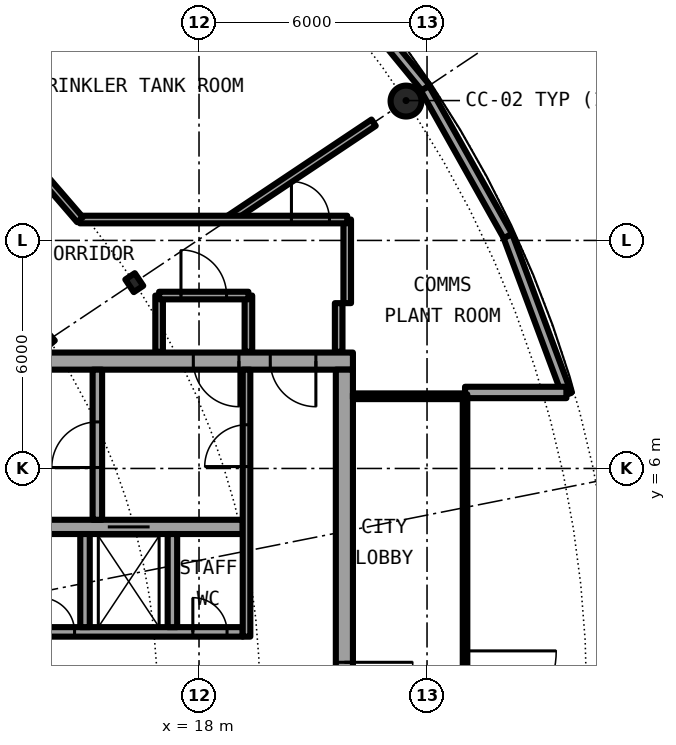
"""IFC4 building model, lengths in metres.
Left out: names, types, materials, properties, quantities, classifications, styles, units other than length and angle.
Written with IfcOpenShell. Run it as: python <this file> out.ifc"""

import sys

from ifc_helpers import new_model, si_unit, direction, frame, frame_2d, origin, origin_2d, place, context, subcontext, project, spatial, rectangle, hollow_circle, i_section, extrude, element, fill, save


model = new_model("IFC4")
c1 = context("Model", 3, precision=1e-05, world=origin(), true_north=direction((0.0, 1.0)))
c2 = subcontext(c1, "Body", "Model", "MODEL_VIEW")
j1 = project(units=[si_unit("LENGTHUNIT", "METRE"), si_unit("PLANEANGLEUNIT", "RADIAN")], contexts=[c1])
p1 = place(None, origin())
s1 = spatial("IfcSite", under=j1, at=p1, CompositionType="ELEMENT")
p2 = place(p1, origin())
s2 = spatial("IfcBuilding", under=s1, at=p2, CompositionType="ELEMENT")
p3 = place(p2, frame((0.0, 0.0, 186.0)))
s3 = spatial("IfcBuildingStorey", under=s2, at=p3, CompositionType="ELEMENT", Elevation=186.0)
p4 = place(p3, frame((23.448, 15.667, 0.0), z_axis=(0.0, 0.0, 1.0), x_axis=(1.0, 0.0, 0.0)))
e1 = element("IfcColumn", 1, at=p4, inside=s3, PredefinedType="COLUMN", context=c2, shape_type="SweptSolid", body=[
    extrude(hollow_circle(Radius=0.406, WallThickness=0.03, at=origin_2d()), origin(), (0.0, 0.0, 1.0), 4.2),
])
p5 = place(p3, frame((16.297, 10.889, 0.0), z_axis=(0.0, 0.0, 1.0), x_axis=(0.831469612303, 0.55557023302, 0.0)))
e2 = element("IfcColumn", 2, at=p5, inside=s3, PredefinedType="COLUMN", context=c2, shape_type="SweptSolid", body=[
    extrude(i_section(OverallWidth=0.3, OverallDepth=0.4, WebThickness=0.013, FlangeThickness=0.024, FilletRadius=0.027, at=origin_2d()), origin(), (0.0, 0.0, 1.0), 4.2),
])
p6 = place(p3, frame((23.967, 16.014, 0.0), z_axis=(0.0, 0.0, 1.0), x_axis=(-0.634403999748, 0.773001659186, 0.0)))
e3 = element("IfcWall", 3, at=p6, inside=s3, PredefinedType="SOLIDWALL", context=c2, shape_type="SweptSolid", body=[
    extrude(rectangle(XDim=5.651, YDim=0.25, at=frame_2d((2.825, 0.0))), origin(), (0.0, 0.0, 1.0), 3.85),
])
p7 = place(p3, frame((27.682, 7.945, 0.0), z_axis=(0.0, 0.0, 1.0), x_axis=(-0.349247811493, 0.937030397675, 0.0)))
e4 = element("IfcWall", 4, at=p7, inside=s3, PredefinedType="SOLIDWALL", context=c2, shape_type="SweptSolid", body=[
    extrude(rectangle(XDim=4.452, YDim=0.25, at=frame_2d((2.226, 0.0))), origin(), (0.0, 0.0, 1.0), 3.85),
])
p8 = place(p3, frame((26.127, 12.117, 0.0), z_axis=(0.0, 0.0, 1.0), x_axis=(-0.489696356642, 0.871893042919, 0.0)))
e5 = element("IfcWall", 5, at=p8, inside=s3, PredefinedType="SOLIDWALL", context=c2, shape_type="SweptSolid", body=[
    extrude(rectangle(XDim=4.454, YDim=0.25, at=frame_2d((2.227, 0.0))), origin(), (0.0, 0.0, 1.0), 3.85),
])
p9 = place(p3, frame((25.0, 8.0, 0.0), z_axis=(0.0, 0.0, 1.0), x_axis=(1.0, 0.0, 0.0)))
e6 = element("IfcWall", 6, at=p9, inside=s3, PredefinedType="SOLIDWALL", context=c2, shape_type="SweptSolid", body=[
    extrude(rectangle(XDim=2.667, YDim=0.3, at=frame_2d((1.333, 0.0))), origin(), (0.0, 0.0, 1.0), 3.85),
])
p10 = place(p3, frame((22.05, 8.825, 0.0), z_axis=(0.0, 0.0, 1.0), x_axis=(-1.0, 0.0, 0.0)))
e7 = element("IfcWall", 7, at=p10, inside=s3, PredefinedType="SHEAR", context=c2, shape_type="SweptSolid", body=[
    extrude(rectangle(XDim=13.5, YDim=0.45, at=frame_2d((6.75, 0.0))), origin(), (0.0, 0.0, 1.0), 4.2),
])
p11 = place(p10, frame((0.975, 0.0, 0.0)))
e8 = element("IfcOpeningElement", 8, at=p11, cuts=e7, PredefinedType="OPENING", context=c2, shape_type="SweptSolid", body=[
    extrude(rectangle(XDim=1.2, YDim=2.3, at=frame_2d((0.6, 1.15))), frame((0.0, 0.235, 0.0), z_axis=(0.0, -1.0, 0.0), x_axis=(1.0, 0.0, 0.0)), (0.0, 0.0, 1.0), 0.47),
])
p12 = place(p10, frame((3.0, 0.0, 0.0)))
e9 = element("IfcOpeningElement", 9, at=p12, cuts=e7, PredefinedType="OPENING", context=c2, shape_type="SweptSolid", body=[
    extrude(rectangle(XDim=1.2, YDim=2.3, at=frame_2d((0.6, 1.15))), frame((0.0, 0.235, 0.0), z_axis=(0.0, -1.0, 0.0), x_axis=(1.0, 0.0, 0.0)), (0.0, 0.0, 1.0), 0.47),
])
p13 = place(p3, frame((21.825, 8.6, 0.0), z_axis=(0.0, 0.0, 1.0), x_axis=(0.0, -1.0, 0.0)))
e10 = element("IfcWall", 10, at=p13, inside=s3, PredefinedType="SHEAR", context=c2, shape_type="SweptSolid", body=[
    extrude(rectangle(XDim=17.2, YDim=0.45, at=frame_2d((8.6, 0.0))), origin(), (0.0, 0.0, 1.0), 4.2),
])
p14 = place(p13, frame((7.7, 0.0, 0.0)))
e11 = element("IfcOpeningElement", 11, at=p14, cuts=e10, PredefinedType="OPENING", context=c2, shape_type="SweptSolid", body=[
    extrude(rectangle(XDim=1.8, YDim=2.3, at=frame_2d((0.9, 1.15))), frame((0.0, 0.235, 0.0), z_axis=(0.0, -1.0, 0.0), x_axis=(1.0, 0.0, 0.0)), (0.0, 0.0, 1.0), 0.47),
])
p15 = place(p3, frame((9.0, 1.7, 0.0), z_axis=(0.0, 0.0, 1.0), x_axis=(1.0, 0.0, 0.0)))
e12 = element("IfcWall", 12, at=p15, inside=s3, PredefinedType="SHEAR", context=c2, shape_type="SweptSolid", body=[
    extrude(rectangle(XDim=10.15, YDim=0.25, at=frame_2d((5.075, 0.0))), origin(), (0.0, 0.0, 1.0), 4.2),
])
p16 = place(p15, frame((0.613, 0.0, 0.0)))
e13 = element("IfcOpeningElement", 13, at=p16, cuts=e12, PredefinedType="OPENING", context=c2, shape_type="SweptSolid", body=[
    extrude(rectangle(XDim=0.9, YDim=2.3, at=frame_2d((0.45, 1.15))), frame((0.0, 0.135, 0.0), z_axis=(0.0, -1.0, 0.0), x_axis=(1.0, 0.0, 0.0)), (0.0, 0.0, 1.0), 0.27),
])
p17 = place(p15, frame((2.95, 0.0, 0.0)))
e14 = element("IfcOpeningElement", 14, at=p17, cuts=e12, PredefinedType="OPENING", context=c2, shape_type="SweptSolid", body=[
    extrude(rectangle(XDim=0.9, YDim=2.3, at=frame_2d((0.45, 1.15))), frame((0.0, 0.135, 0.0), z_axis=(0.0, -1.0, 0.0), x_axis=(1.0, 0.0, 0.0)), (0.0, 0.0, 1.0), 0.27),
])
p18 = place(p15, frame((4.825, 0.0, 0.0)))
e15 = element("IfcOpeningElement", 15, at=p18, cuts=e12, PredefinedType="OPENING", context=c2, shape_type="SweptSolid", body=[
    extrude(rectangle(XDim=0.9, YDim=2.3, at=frame_2d((0.45, 1.15))), frame((0.0, 0.135, 0.0), z_axis=(0.0, -1.0, 0.0), x_axis=(1.0, 0.0, 0.0)), (0.0, 0.0, 1.0), 0.27),
])
p19 = place(p15, frame((8.837, 0.0, 0.0)))
e16 = element("IfcOpeningElement", 16, at=p19, cuts=e12, PredefinedType="OPENING", context=c2, shape_type="SweptSolid", body=[
    extrude(rectangle(XDim=0.9, YDim=2.3, at=frame_2d((0.45, 1.15))), frame((0.0, 0.135, 0.0), z_axis=(0.0, -1.0, 0.0), x_axis=(1.0, 0.0, 0.0)), (0.0, 0.0, 1.0), 0.27),
])
p20 = place(p3, frame((9.0, 4.462, 0.0), z_axis=(0.0, 0.0, 1.0), x_axis=(1.0, 0.0, 0.0)))
e17 = element("IfcWall", 17, at=p20, inside=s3, PredefinedType="SHEAR", context=c2, shape_type="SweptSolid", body=[
    extrude(rectangle(XDim=10.15, YDim=0.375, at=frame_2d((5.075, 0.0))), origin(), (0.0, 0.0, 1.0), 4.2),
])
p21 = place(p20, frame((6.6, 0.0, 0.0)))
e18 = element("IfcOpeningElement", 18, at=p21, cuts=e17, PredefinedType="OPENING", context=c2, shape_type="SweptSolid", body=[
    extrude(rectangle(XDim=1.1, YDim=2.3, at=frame_2d((0.55, 1.15))), frame((0.0, 0.198, 0.0), z_axis=(0.0, -1.0, 0.0), x_axis=(1.0, 0.0, 0.0)), (0.0, 0.0, 1.0), 0.395),
])
p22 = place(p3, frame((15.325, 4.65, 0.0), z_axis=(0.0, 0.0, 1.0), x_axis=(0.0, 1.0, 0.0)))
e19 = element("IfcWall", 19, at=p22, inside=s3, PredefinedType="SHEAR", context=c2, shape_type="SweptSolid", body=[
    extrude(rectangle(XDim=3.95, YDim=0.25, at=frame_2d((1.975, 0.0))), origin(), (0.0, 0.0, 1.0), 4.2),
])
p23 = place(p22, frame((1.375, 0.0, 0.0)))
e20 = element("IfcOpeningElement", 20, at=p23, cuts=e19, PredefinedType="OPENING", context=c2, shape_type="SweptSolid", body=[
    extrude(rectangle(XDim=1.2, YDim=2.3, at=frame_2d((0.6, 1.15))), frame((0.0, 0.135, 0.0), z_axis=(0.0, -1.0, 0.0), x_axis=(1.0, 0.0, 0.0)), (0.0, 0.0, 1.0), 0.27),
])
for number, where, z_axis, x_axis in (
    (21, (15.0, 1.825, 0.0), (0.0, 0.0, 1.0), (0.0, 1.0, 0.0)),
    (22, (17.3, 1.825, 0.0), (0.0, 0.0, 1.0), (0.0, 1.0, 0.0)),
):
    element("IfcWall", number, at=place(p3, frame(where, z_axis=z_axis, x_axis=x_axis)), inside=s3, PredefinedType="SOLIDWALL", context=c2, shape_type="SweptSolid", body=[
        extrude(rectangle(XDim=2.45, YDim=0.25, at=frame_2d((1.225, 0.0))), origin(), (0.0, 0.0, 1.0), 3.85),
    ])
p24 = place(p3, frame((19.25, 1.575, 0.0), z_axis=(0.0, 0.0, 1.0), x_axis=(0.0, 1.0, 0.0)))
e23 = element("IfcWall", 23, at=p24, inside=s3, PredefinedType="SOLIDWALL", context=c2, shape_type="SweptSolid", body=[
    extrude(rectangle(XDim=7.025, YDim=0.2, at=frame_2d((3.513, 0.0))), origin(), (0.0, 0.0, 1.0), 3.85),
])
p25 = place(p24, frame((4.475, 0.0, 0.0)))
e24 = element("IfcOpeningElement", 24, at=p25, cuts=e23, PredefinedType="OPENING", context=c2, shape_type="SweptSolid", body=[
    extrude(rectangle(XDim=1.1, YDim=2.3, at=frame_2d((0.55, 1.15))), frame((0.0, 0.11, 0.0), z_axis=(0.0, -1.0, 0.0), x_axis=(1.0, 0.0, 0.0)), (0.0, 0.0, 1.0), 0.22),
])
p26 = place(p3, frame((22.05, 7.9, 0.0), z_axis=(0.0, 0.0, 1.0), x_axis=(1.0, 0.0, 0.0)))
e25 = element("IfcWall", 25, at=p26, inside=s3, PredefinedType="PARTITIONING", context=c2, shape_type="SweptSolid", body=[
    extrude(rectangle(XDim=2.89, YDim=0.15, at=frame_2d((1.445, 0.0))), origin(), (0.0, 0.0, 1.0), 3.85),
])
p27 = place(p3, frame((25.0, 7.95, 0.0), z_axis=(0.0, 0.0, 1.0), x_axis=(0.0, -1.0, 0.0)))
e26 = element("IfcWall", 26, at=p27, inside=s3, PredefinedType="PARTITIONING", context=c2, shape_type="SweptSolid", body=[
    extrude(rectangle(XDim=15.9, YDim=0.12, at=frame_2d((7.95, 0.0))), origin(), (0.0, 0.0, 1.0), 3.85),
])
p28 = place(p27, frame((6.75, 0.0, 0.0)))
e27 = element("IfcOpeningElement", 27, at=p28, cuts=e26, PredefinedType="OPENING", context=c2, shape_type="SweptSolid", body=[
    extrude(rectangle(XDim=2.4, YDim=2.3, at=frame_2d((1.2, 1.15))), frame((0.0, 0.07, 0.0), z_axis=(0.0, -1.0, 0.0), x_axis=(1.0, 0.0, 0.0)), (0.0, 0.0, 1.0), 0.14),
])
p29 = place(p27, frame((11.55, 0.0, 0.1)))
e28 = element("IfcOpeningElement", 28, at=p29, cuts=e26, PredefinedType="OPENING", context=c2, shape_type="SweptSolid", body=[
    extrude(rectangle(XDim=3.4, YDim=3.5, at=frame_2d((1.7, 1.75))), frame((0.0, 0.07, 0.0), z_axis=(0.0, -1.0, 0.0), x_axis=(1.0, 0.0, 0.0)), (0.0, 0.0, 1.0), 0.14),
])
p30 = place(p27, frame((0.95, 0.0, 0.1)))
e29 = element("IfcOpeningElement", 29, at=p30, cuts=e26, PredefinedType="OPENING", context=c2, shape_type="SweptSolid", body=[
    extrude(rectangle(XDim=3.4, YDim=3.5, at=frame_2d((1.7, 1.75))), frame((0.0, 0.07, 0.0), z_axis=(0.0, -1.0, 0.0), x_axis=(1.0, 0.0, 0.0)), (0.0, 0.0, 1.0), 0.14),
])
p31 = place(p3, frame((21.9, 10.35, 0.0), z_axis=(0.0, 0.0, 1.0), x_axis=(0.0, 1.0, 0.0)))
e30 = element("IfcWall", 30, at=p31, inside=s3, PredefinedType="PARTITIONING", context=c2, shape_type="SweptSolid", body=[
    extrude(rectangle(XDim=2.2, YDim=0.2, at=frame_2d((1.1, 0.0))), origin(), (0.0, 0.0, 1.0), 3.85),
])
p32 = place(p3, frame((21.675, 9.07, 0.0), z_axis=(0.0, 0.0, 1.0), x_axis=(0.0, 1.0, 0.0)))
e31 = element("IfcWall", 31, at=p32, inside=s3, PredefinedType="PARTITIONING", context=c2, shape_type="SweptSolid", body=[
    extrude(rectangle(XDim=1.28, YDim=0.2, at=frame_2d((0.64, 0.0))), origin(), (0.0, 0.0, 1.0), 3.85),
])
for number, where, z_axis, x_axis in (
    (32, (19.3, 9.07, 0.0), (0.0, 0.0, 1.0), (0.0, 1.0, 0.0)),
    (33, (16.95, 9.07, 0.0), (0.0, 0.0, 1.0), (0.0, 1.0, 0.0)),
):
    element("IfcWall", number, at=place(p3, frame(where, z_axis=z_axis, x_axis=x_axis)), inside=s3, PredefinedType="PARTITIONING", context=c2, shape_type="SweptSolid", body=[
        extrude(rectangle(XDim=1.48, YDim=0.2, at=frame_2d((0.74, 0.0))), origin(), (0.0, 0.0, 1.0), 3.85),
    ])
p33 = place(p3, frame((18.782, 12.55, 0.0), z_axis=(0.0, 0.0, 1.0), x_axis=(0.831460118694, 0.555584440946, 0.0)))
e34 = element("IfcWall", 34, at=p33, inside=s3, PredefinedType="PARTITIONING", context=c2, shape_type="SweptSolid", body=[
    extrude(rectangle(XDim=4.586, YDim=0.2, at=frame_2d((2.293, 0.0))), origin(), (0.0, 0.0, 1.0), 3.85),
])
p34 = place(p3, frame((16.95, 10.55, 0.0), z_axis=(0.0, 0.0, 1.0), x_axis=(1.0, 0.0, 0.0)))
e35 = element("IfcWall", 35, at=p34, inside=s3, PredefinedType="PARTITIONING", context=c2, shape_type="SweptSolid", body=[
    extrude(rectangle(XDim=2.35, YDim=0.2, at=frame_2d((1.175, 0.0))), origin(), (0.0, 0.0, 1.0), 3.85),
])
p35 = place(p34, frame((0.575, 0.0, 0.0)))
e36 = element("IfcOpeningElement", 36, at=p35, cuts=e35, PredefinedType="OPENING", context=c2, shape_type="SweptSolid", body=[
    extrude(rectangle(XDim=1.2, YDim=2.3, at=frame_2d((0.6, 1.15))), frame((0.0, 0.11, 0.0), z_axis=(0.0, -1.0, 0.0), x_axis=(1.0, 0.0, 0.0)), (0.0, 0.0, 1.0), 0.22),
])
p36 = place(p3, frame((14.865, 12.55, 0.0), z_axis=(0.0, 0.0, 1.0), x_axis=(1.0, 0.0, 0.0)))
e37 = element("IfcWall", 37, at=p36, inside=s3, PredefinedType="PARTITIONING", context=c2, shape_type="SweptSolid", body=[
    extrude(rectangle(XDim=7.035, YDim=0.2, at=frame_2d((3.518, 0.0))), origin(), (0.0, 0.0, 1.0), 3.85),
])
p37 = place(p36, frame((5.567, 0.0, 0.0)))
e38 = element("IfcOpeningElement", 38, at=p37, cuts=e37, PredefinedType="OPENING", context=c2, shape_type="SweptSolid", body=[
    extrude(rectangle(XDim=1.0, YDim=2.3, at=frame_2d((0.5, 1.15))), frame((0.0, 0.11, 0.0), z_axis=(0.0, -1.0, 0.0), x_axis=(1.0, 0.0, 0.0)), (0.0, 0.0, 1.0), 0.22),
])
p38 = place(p3, frame((11.349, 12.522, 0.0), z_axis=(0.0, 0.0, 1.0), x_axis=(0.65324486504, -0.757146713853, 0.0)))
e39 = element("IfcWall", 39, at=p38, inside=s3, PredefinedType="PARTITIONING", context=c2, shape_type="SweptSolid", body=[
    extrude(rectangle(XDim=4.255, YDim=0.2, at=frame_2d((2.128, 0.0))), origin(), (0.0, 0.0, 1.0), 3.85),
])
p39 = place(p38, frame((1.569, 0.0, 0.0)))
e40 = element("IfcOpeningElement", 40, at=p39, cuts=e39, PredefinedType="OPENING", context=c2, shape_type="SweptSolid", body=[
    extrude(rectangle(XDim=1.0, YDim=2.3, at=frame_2d((0.5, 1.15))), frame((0.0, 0.11, 0.0), z_axis=(0.0, -1.0, 0.0), x_axis=(1.0, 0.0, 0.0)), (0.0, 0.0, 1.0), 0.22),
])
p40 = place(p3, frame((13.163, 14.523, 0.0), z_axis=(0.0, 0.0, 1.0), x_axis=(0.653045064141, -0.757319050467, 0.0)))
e41 = element("IfcWall", 41, at=p40, inside=s3, PredefinedType="PARTITIONING", context=c2, shape_type="SweptSolid", body=[
    extrude(rectangle(XDim=2.611, YDim=0.2, at=frame_2d((1.305, 0.0))), origin(), (0.0, 0.0, 1.0), 3.85),
])
p41 = place(p21, origin())
e42 = element("IfcDoor", 42, at=p41, inside=s3, OperationType="DOUBLE_DOOR_SLIDING", PredefinedType="DOOR", context=c2, shape_type="SweptSolid", body=[
    extrude(rectangle(XDim=1.1, YDim=2.3, at=frame_2d((0.55, 1.15))), frame((0.0, 0.025, 0.0), z_axis=(0.0, -1.0, 0.0), x_axis=(1.0, 0.0, 0.0)), (0.0, 0.0, 1.0), 0.05),
])
fill(e18, e42)
p42 = place(p18, origin())
e43 = element("IfcDoor", 43, at=p42, inside=s3, OperationType="SINGLE_SWING_LEFT", PredefinedType="DOOR", context=c2, shape_type="SweptSolid", body=[
    extrude(rectangle(XDim=0.9, YDim=2.3, at=frame_2d((0.45, 1.15))), frame((0.0, 0.025, 0.0), z_axis=(0.0, -1.0, 0.0), x_axis=(1.0, 0.0, 0.0)), (0.0, 0.0, 1.0), 0.05),
])
fill(e15, e43)
p43 = place(p19, origin())
e44 = element("IfcDoor", 44, at=p43, inside=s3, OperationType="SINGLE_SWING_LEFT", PredefinedType="DOOR", context=c2, shape_type="SweptSolid", body=[
    extrude(rectangle(XDim=0.9, YDim=2.3, at=frame_2d((0.45, 1.15))), frame((0.0, 0.025, 0.0), z_axis=(0.0, -1.0, 0.0), x_axis=(1.0, 0.0, 0.0)), (0.0, 0.0, 1.0), 0.05),
])
fill(e16, e44)
p44 = place(p23, origin())
e45 = element("IfcDoor", 45, at=p44, inside=s3, OperationType="SINGLE_SWING_LEFT", PredefinedType="DOOR", context=c2, shape_type="SweptSolid", body=[
    extrude(rectangle(XDim=1.2, YDim=2.3, at=frame_2d((0.6, 1.15))), frame((0.0, 0.025, 0.0), z_axis=(0.0, -1.0, 0.0), x_axis=(1.0, 0.0, 0.0)), (0.0, 0.0, 1.0), 0.05),
])
fill(e20, e45)
p45 = place(p25, origin())
e46 = element("IfcDoor", 46, at=p45, inside=s3, OperationType="SINGLE_SWING_LEFT", PredefinedType="DOOR", context=c2, shape_type="SweptSolid", body=[
    extrude(rectangle(XDim=1.1, YDim=2.3, at=frame_2d((0.55, 1.15))), frame((0.0, 0.025, 0.0), z_axis=(0.0, -1.0, 0.0), x_axis=(1.0, 0.0, 0.0)), (0.0, 0.0, 1.0), 0.05),
])
fill(e24, e46)
p46 = place(p11, origin())
e47 = element("IfcDoor", 47, at=p46, inside=s3, OperationType="SINGLE_SWING_RIGHT", PredefinedType="DOOR", context=c2, shape_type="SweptSolid", body=[
    extrude(rectangle(XDim=1.2, YDim=2.3, at=frame_2d((0.6, 1.15))), frame((0.0, 0.025, 0.0), z_axis=(0.0, -1.0, 0.0), x_axis=(1.0, 0.0, 0.0)), (0.0, 0.0, 1.0), 0.05),
])
fill(e8, e47)
p47 = place(p12, origin())
e48 = element("IfcDoor", 48, at=p47, inside=s3, OperationType="SINGLE_SWING_RIGHT", PredefinedType="DOOR", context=c2, shape_type="SweptSolid", body=[
    extrude(rectangle(XDim=1.2, YDim=2.3, at=frame_2d((0.6, 1.15))), frame((0.0, 0.025, 0.0), z_axis=(0.0, -1.0, 0.0), x_axis=(1.0, 0.0, 0.0)), (0.0, 0.0, 1.0), 0.05),
])
fill(e9, e48)
p48 = place(p14, origin())
e49 = element("IfcDoor", 49, at=p48, inside=s3, OperationType="SINGLE_SWING_LEFT", PredefinedType="DOOR", context=c2, shape_type="SweptSolid", body=[
    extrude(rectangle(XDim=1.8, YDim=2.3, at=frame_2d((0.9, 1.15))), frame((0.0, 0.025, 0.0), z_axis=(0.0, -1.0, 0.0), x_axis=(1.0, 0.0, 0.0)), (0.0, 0.0, 1.0), 0.05),
])
fill(e11, e49)
p49 = place(p28, origin())
e50 = element("IfcDoor", 50, at=p49, inside=s3, OperationType="SINGLE_SWING_LEFT", PredefinedType="DOOR", context=c2, shape_type="SweptSolid", body=[
    extrude(rectangle(XDim=2.4, YDim=2.3, at=frame_2d((1.2, 1.15))), frame((0.0, 0.025, 0.0), z_axis=(0.0, -1.0, 0.0), x_axis=(1.0, 0.0, 0.0)), (0.0, 0.0, 1.0), 0.05),
])
fill(e27, e50)
p50 = place(p30, origin())
e51 = element("IfcWindow", 51, at=p50, inside=s3, PartitioningType="SINGLE_PANEL", PredefinedType="WINDOW", context=c2, shape_type="SweptSolid", body=[
    extrude(rectangle(XDim=3.4, YDim=3.5, at=frame_2d((1.7, 1.75))), frame((0.0, 0.03, 0.0), z_axis=(0.0, -1.0, 0.0), x_axis=(1.0, 0.0, 0.0)), (0.0, 0.0, 1.0), 0.06),
])
fill(e29, e51)
p51 = place(p35, origin())
e52 = element("IfcDoor", 52, at=p51, inside=s3, OperationType="SINGLE_SWING_LEFT", PredefinedType="DOOR", context=c2, shape_type="SweptSolid", body=[
    extrude(rectangle(XDim=1.2, YDim=2.3, at=frame_2d((0.6, 1.15))), frame((0.0, 0.025, 0.0), z_axis=(0.0, -1.0, 0.0), x_axis=(1.0, 0.0, 0.0)), (0.0, 0.0, 1.0), 0.05),
])
fill(e36, e52)
p52 = place(p37, origin())
e53 = element("IfcDoor", 53, at=p52, inside=s3, OperationType="SINGLE_SWING_RIGHT", PredefinedType="DOOR", context=c2, shape_type="SweptSolid", body=[
    extrude(rectangle(XDim=1.0, YDim=2.3, at=frame_2d((0.5, 1.15))), frame((0.0, 0.025, 0.0), z_axis=(0.0, -1.0, 0.0), x_axis=(1.0, 0.0, 0.0)), (0.0, 0.0, 1.0), 0.05),
])
fill(e38, e53)
save(model, sys.argv[1])
